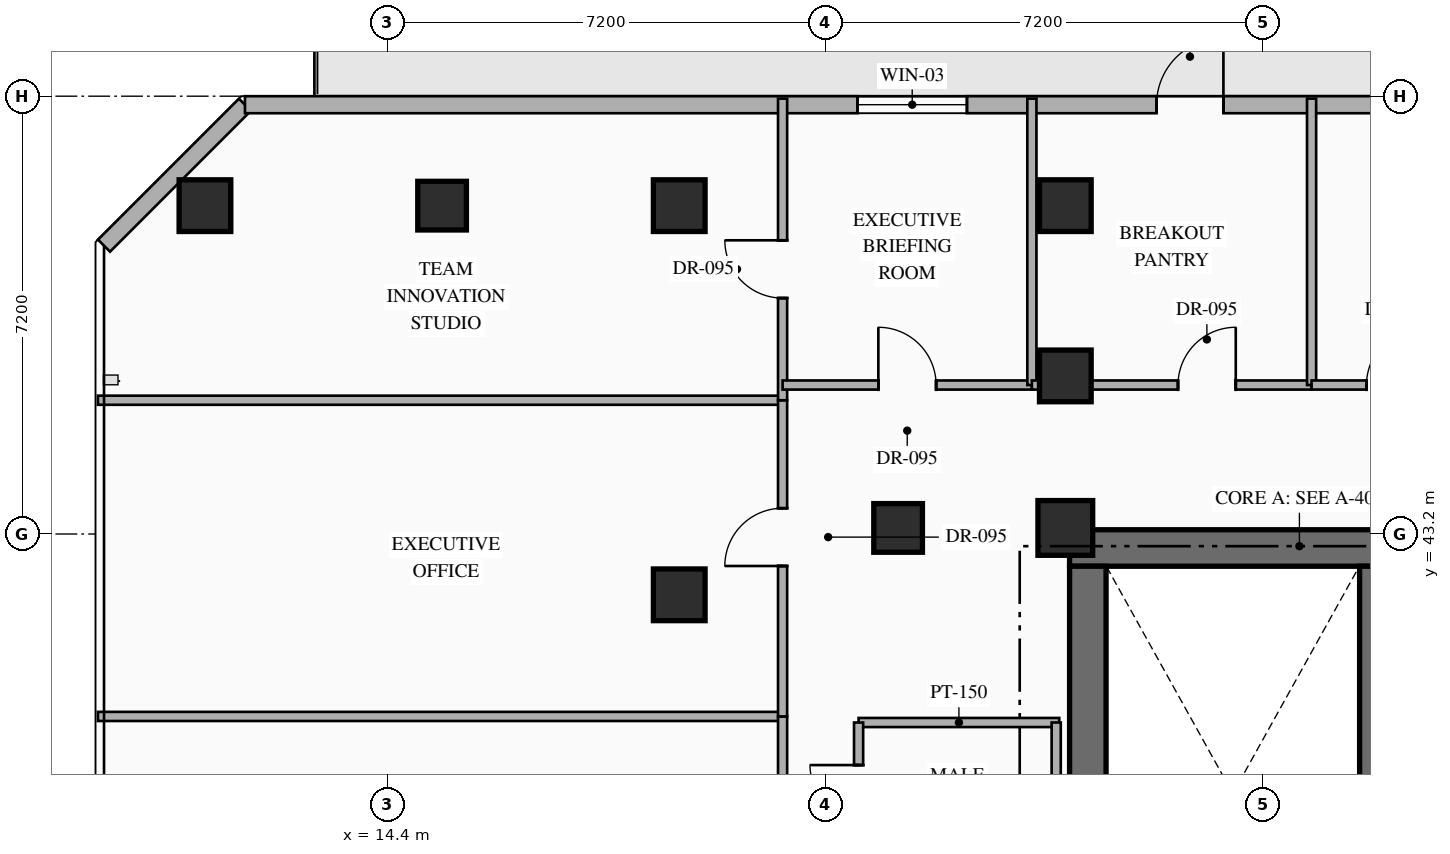
"""IFC4 building model, lengths in metres.
Left out: names, types, materials, properties, quantities, classifications, styles, units other than length and angle.
Written with IfcOpenShell. Run it as: python <this file> out.ifc"""

import sys

from ifc_helpers import new_model, si_unit, direction, frame, frame_2d, origin, origin_2d, place, context, subcontext, project, spatial, rectangle, hollow_rectangle, extrude, element, fill, save


model = new_model("IFC4")
c1 = context("Model", 3, precision=1e-05, world=origin(), true_north=direction((0.0, 1.0)))
c2 = subcontext(c1, "Body", "Model", "MODEL_VIEW")
j1 = project(units=[si_unit("LENGTHUNIT", "METRE"), si_unit("PLANEANGLEUNIT", "RADIAN")], contexts=[c1])
p1 = place(None, origin())
s1 = spatial("IfcSite", under=j1, at=p1, CompositionType="ELEMENT")
p2 = place(p1, origin())
s2 = spatial("IfcBuilding", under=s1, at=p2, CompositionType="ELEMENT")
p3 = place(p2, frame((0.0, 0.0, 149.25)))
s3 = spatial("IfcBuildingStorey", under=s2, at=p3, CompositionType="ELEMENT", Elevation=149.25)
p4 = place(p3, frame((25.62, 42.97, 0.0), z_axis=(0.0, 0.0, 1.0), x_axis=(1.0, 0.0, 0.0)))
e1 = element("IfcWall", 1, at=p4, inside=s3, PredefinedType="SHEAR", context=c2, shape_type="SweptSolid", body=[
    extrude(rectangle(XDim=7.78, YDim=0.6, at=frame_2d((3.89, 0.0))), origin(), (0.0, 0.0, 1.0), 3.6),
])
p5 = place(p3, frame((25.92, 33.19, 0.0), z_axis=(0.0, 0.0, 1.0), x_axis=(0.0, 1.0, 0.0)))
e2 = element("IfcWall", 2, at=p5, inside=s3, PredefinedType="SHEAR", context=c2, shape_type="SweptSolid", body=[
    extrude(rectangle(XDim=9.48, YDim=0.6, at=frame_2d((4.74, 0.0))), origin(), (0.0, 0.0, 1.0), 3.6),
])
p6 = place(p3, frame((30.54, 33.19, 0.0), z_axis=(0.0, 0.0, 1.0), x_axis=(0.0, 1.0, 0.0)))
e3 = element("IfcWall", 3, at=p6, inside=s3, PredefinedType="SHEAR", context=c2, shape_type="SweptSolid", body=[
    extrude(rectangle(XDim=9.48, YDim=0.3, at=frame_2d((4.74, 0.0))), origin(), (0.0, 0.0, 1.0), 3.6),
])
p7 = place(p3, frame((25.55, 43.3, 0.0), z_axis=(0.0, 0.0, 1.0), x_axis=(1.0, 0.0, 0.0)))
e4 = element("IfcColumn", 4, at=p7, inside=s3, PredefinedType="COLUMN", context=c2, shape_type="SweptSolid", body=[
    extrude(rectangle(XDim=0.9, YDim=0.9, at=origin_2d()), origin(), (0.0, 0.0, 1.0), 3.6),
])
for number, where, z_axis, x_axis in (
    (5, (25.55, 45.8, 0.0), (0.0, 0.0, 1.0), (1.0, 0.0, 0.0)),
    (6, (11.4, 48.6, 0.0), (0.0, 0.0, 1.0), (1.0, 0.0, 0.0)),
    (7, (19.2, 48.6, 0.0), (0.0, 0.0, 1.0), (1.0, 0.0, 0.0)),
    (8, (25.55, 48.6, 0.0), (0.0, 0.0, 1.0), (1.0, 0.0, 0.0)),
    (9, (19.2, 42.2, 0.0), (0.0, 0.0, 1.0), (1.0, 0.0, 0.0)),
):
    element("IfcColumn", number, at=place(p3, frame(where, z_axis=z_axis, x_axis=x_axis)), inside=s3, PredefinedType="COLUMN", context=c2, shape_type="SweptSolid", body=[
        extrude(hollow_rectangle(XDim=0.85, YDim=0.85, WallThickness=0.032, at=origin_2d()), origin(), (0.0, 0.0, 1.0), 3.6),
    ])
for number, where, z_axis, x_axis in (
    (10, (22.8, 43.3, 0.0), (0.0, 0.0, 1.0), (1.0, 0.0, 0.0)),
    (11, (15.3, 48.6, 0.0), (0.0, 0.0, 1.0), (1.0, 0.0, 0.0)),
):
    element("IfcColumn", number, at=place(p3, frame(where, z_axis=z_axis, x_axis=x_axis)), inside=s3, PredefinedType="COLUMN", context=c2, shape_type="SweptSolid", body=[
        extrude(hollow_rectangle(XDim=0.8, YDim=0.8, WallThickness=0.032, at=origin_2d()), origin(), (0.0, 0.0, 1.0), 3.6),
    ])
p8 = place(p3, frame((9.74, 47.942, 0.0), z_axis=(0.0, 0.0, 1.0), x_axis=(0.707106781187, 0.707106781187, 0.0)))
e12 = element("IfcWall", 12, at=p8, inside=s3, PredefinedType="STANDARD", context=c2, shape_type="SweptSolid", body=[
    extrude(rectangle(XDim=3.278, YDim=0.28, at=frame_2d((1.639, 0.0))), origin(), (0.0, 0.0, 1.0), 3.35),
])
p9 = place(p3, frame((12.058, 50.26, 0.0), z_axis=(0.0, 0.0, 1.0), x_axis=(1.0, 0.0, 0.0)))
e13 = element("IfcWall", 13, at=p9, inside=s3, PredefinedType="STANDARD", context=c2, shape_type="SweptSolid", body=[
    extrude(rectangle(XDim=30.484, YDim=0.28, at=frame_2d((15.242, 0.0))), origin(), (0.0, 0.0, 1.0), 3.35),
])
p10 = place(p9, frame((14.992, 0.0, 0.0)))
e14 = element("IfcOpeningElement", 14, at=p10, cuts=e13, PredefinedType="OPENING", context=c2, shape_type="SweptSolid", body=[
    extrude(rectangle(XDim=1.1, YDim=2.2, at=frame_2d((0.55, 1.1))), frame((0.0, 0.15, 0.0), z_axis=(0.0, -1.0, 0.0), x_axis=(1.0, 0.0, 0.0)), (0.0, 0.0, 1.0), 0.3),
])
p11 = place(p9, frame((10.074, 0.0, 0.85)))
e15 = element("IfcOpeningElement", 15, at=p11, cuts=e13, PredefinedType="OPENING", context=c2, shape_type="SweptSolid", body=[
    extrude(rectangle(XDim=1.8, YDim=2.1, at=frame_2d((0.9, 1.05))), frame((0.0, 0.15, 0.0), z_axis=(0.0, -1.0, 0.0), x_axis=(1.0, 0.0, 0.0)), (0.0, 0.0, 1.0), 0.3),
])
p12 = place(p3, frame((22.15, 40.1, 0.0), z_axis=(0.0, 0.0, 1.0), x_axis=(1.0, 0.0, 0.0)))
e16 = element("IfcWall", 16, at=p12, inside=s3, PredefinedType="PARTITIONING", context=c2, shape_type="SweptSolid", body=[
    extrude(rectangle(XDim=3.3, YDim=0.15, at=frame_2d((1.65, 0.0))), origin(), (0.0, 0.0, 1.0), 3.35),
])
p13 = place(p3, frame((25.4, 33.5, 0.0), z_axis=(0.0, 0.0, 1.0), x_axis=(0.0, 1.0, 0.0)))
e17 = element("IfcWall", 17, at=p13, inside=s3, PredefinedType="PARTITIONING", context=c2, shape_type="SweptSolid", body=[
    extrude(rectangle(XDim=6.6, YDim=0.15, at=frame_2d((3.3, 0.0))), origin(), (0.0, 0.0, 1.0), 3.35),
])
p14 = place(p3, frame((22.15, 37.9, 0.0), z_axis=(0.0, 0.0, 1.0), x_axis=(0.0, 1.0, 0.0)))
e18 = element("IfcWall", 18, at=p14, inside=s3, PredefinedType="PARTITIONING", context=c2, shape_type="SweptSolid", body=[
    extrude(rectangle(XDim=2.2, YDim=0.15, at=frame_2d((1.1, 0.0))), origin(), (0.0, 0.0, 1.0), 3.35),
])
p15 = place(p14, frame((0.7, 0.0, 0.0)))
e19 = element("IfcOpeningElement", 19, at=p15, cuts=e18, PredefinedType="OPENING", context=c2, shape_type="SweptSolid", body=[
    extrude(rectangle(XDim=0.8, YDim=2.06, at=frame_2d((0.4, 1.03))), frame((0.0, 0.085, 0.0), z_axis=(0.0, -1.0, 0.0), x_axis=(1.0, 0.0, 0.0)), (0.0, 0.0, 1.0), 0.17),
])
p16 = place(p3, frame((9.64, 40.2, 0.0), z_axis=(0.0, 0.0, 1.0), x_axis=(1.0, 0.0, 0.0)))
e20 = element("IfcWall", 20, at=p16, inside=s3, PredefinedType="PARTITIONING", context=c2, shape_type="SweptSolid", body=[
    extrude(rectangle(XDim=11.26, YDim=0.15, at=frame_2d((5.63, 0.0))), origin(), (0.0, 0.0, 1.0), 3.35),
])
p17 = place(p3, frame((20.9, 35.6, 0.0), z_axis=(0.0, 0.0, 1.0), x_axis=(0.0, 1.0, 0.0)))
e21 = element("IfcWall", 21, at=p17, inside=s3, PredefinedType="PARTITIONING", context=c2, shape_type="SweptSolid", body=[
    extrude(rectangle(XDim=4.6, YDim=0.15, at=frame_2d((2.3, 0.0))), origin(), (0.0, 0.0, 1.0), 3.35),
])
p18 = place(p17, frame((1.825, 0.0, 0.0)))
e22 = element("IfcOpeningElement", 22, at=p18, cuts=e21, PredefinedType="OPENING", context=c2, shape_type="SweptSolid", body=[
    extrude(rectangle(XDim=0.95, YDim=2.15, at=frame_2d((0.475, 1.075))), frame((0.0, 0.085, 0.0), z_axis=(0.0, -1.0, 0.0), x_axis=(1.0, 0.0, 0.0)), (0.0, 0.0, 1.0), 0.17),
])
p19 = place(p3, frame((9.64, 45.4, 0.0), z_axis=(0.0, 0.0, 1.0), x_axis=(1.0, 0.0, 0.0)))
e23 = element("IfcWall", 23, at=p19, inside=s3, PredefinedType="PARTITIONING", context=c2, shape_type="SweptSolid", body=[
    extrude(rectangle(XDim=11.26, YDim=0.15, at=frame_2d((5.63, 0.0))), origin(), (0.0, 0.0, 1.0), 3.35),
])
p20 = place(p3, frame((20.9, 40.2, 0.0), z_axis=(0.0, 0.0, 1.0), x_axis=(0.0, 1.0, 0.0)))
e24 = element("IfcWall", 24, at=p20, inside=s3, PredefinedType="PARTITIONING", context=c2, shape_type="SweptSolid", body=[
    extrude(rectangle(XDim=5.2, YDim=0.15, at=frame_2d((2.6, 0.0))), origin(), (0.0, 0.0, 1.0), 3.35),
])
p21 = place(p20, frame((2.474, 0.0, 0.0)))
e25 = element("IfcOpeningElement", 25, at=p21, cuts=e24, PredefinedType="OPENING", context=c2, shape_type="SweptSolid", body=[
    extrude(rectangle(XDim=0.95, YDim=2.15, at=frame_2d((0.475, 1.075))), frame((0.0, 0.085, 0.0), z_axis=(0.0, -1.0, 0.0), x_axis=(1.0, 0.0, 0.0)), (0.0, 0.0, 1.0), 0.17),
])
p22 = place(p3, frame((20.9, 45.4, 0.0), z_axis=(0.0, 0.0, 1.0), x_axis=(0.0, 1.0, 0.0)))
e26 = element("IfcWall", 26, at=p22, inside=s3, PredefinedType="PARTITIONING", context=c2, shape_type="SweptSolid", body=[
    extrude(rectangle(XDim=4.96, YDim=0.15, at=frame_2d((2.48, 0.0))), origin(), (0.0, 0.0, 1.0), 3.35),
])
p23 = place(p22, frame((1.68, 0.0, 0.0)))
e27 = element("IfcOpeningElement", 27, at=p23, cuts=e26, PredefinedType="OPENING", context=c2, shape_type="SweptSolid", body=[
    extrude(rectangle(XDim=0.95, YDim=2.15, at=frame_2d((0.475, 1.075))), frame((0.0, 0.085, 0.0), z_axis=(0.0, -1.0, 0.0), x_axis=(1.0, 0.0, 0.0)), (0.0, 0.0, 1.0), 0.17),
])
p24 = place(p3, frame((20.9, 45.65, 0.0), z_axis=(0.0, 0.0, 1.0), x_axis=(1.0, 0.0, 0.0)))
e28 = element("IfcWall", 28, at=p24, inside=s3, PredefinedType="PARTITIONING", context=c2, shape_type="SweptSolid", body=[
    extrude(rectangle(XDim=4.1, YDim=0.15, at=frame_2d((2.05, 0.0))), origin(), (0.0, 0.0, 1.0), 3.35),
])
p25 = place(p24, frame((1.575, 0.0, 0.0)))
e29 = element("IfcOpeningElement", 29, at=p25, cuts=e28, PredefinedType="OPENING", context=c2, shape_type="SweptSolid", body=[
    extrude(rectangle(XDim=0.95, YDim=2.15, at=frame_2d((0.475, 1.075))), frame((0.0, 0.085, 0.0), z_axis=(0.0, -1.0, 0.0), x_axis=(1.0, 0.0, 0.0)), (0.0, 0.0, 1.0), 0.17),
])
p26 = place(p3, frame((25.0, 45.65, 0.0), z_axis=(0.0, 0.0, 1.0), x_axis=(0.0, 1.0, 0.0)))
e30 = element("IfcWall", 30, at=p26, inside=s3, PredefinedType="PARTITIONING", context=c2, shape_type="SweptSolid", body=[
    extrude(rectangle(XDim=4.71, YDim=0.15, at=frame_2d((2.355, 0.0))), origin(), (0.0, 0.0, 1.0), 3.35),
])
p27 = place(p3, frame((25.0, 45.65, 0.0), z_axis=(0.0, 0.0, 1.0), x_axis=(1.0, 0.0, 0.0)))
e31 = element("IfcWall", 31, at=p27, inside=s3, PredefinedType="PARTITIONING", context=c2, shape_type="SweptSolid", body=[
    extrude(rectangle(XDim=4.6, YDim=0.15, at=frame_2d((2.3, 0.0))), origin(), (0.0, 0.0, 1.0), 2.695),
])
p28 = place(p27, frame((2.403, 0.0, 0.0)))
e32 = element("IfcOpeningElement", 32, at=p28, cuts=e31, PredefinedType="OPENING", context=c2, shape_type="SweptSolid", body=[
    extrude(rectangle(XDim=0.95, YDim=2.15, at=frame_2d((0.475, 1.075))), frame((0.0, 0.085, 0.0), z_axis=(0.0, -1.0, 0.0), x_axis=(1.0, 0.0, 0.0)), (0.0, 0.0, 1.0), 0.17),
])
p29 = place(p3, frame((29.6, 45.65, 0.0), z_axis=(0.0, 0.0, 1.0), x_axis=(0.0, 1.0, 0.0)))
e33 = element("IfcWall", 33, at=p29, inside=s3, PredefinedType="PARTITIONING", context=c2, shape_type="SweptSolid", body=[
    extrude(rectangle(XDim=4.71, YDim=0.15, at=frame_2d((2.355, 0.0))), origin(), (0.0, 0.0, 1.0), 3.35),
])
p30 = place(p3, frame((29.6, 45.65, 0.0), z_axis=(0.0, 0.0, 1.0), x_axis=(1.0, 0.0, 0.0)))
e34 = element("IfcWall", 34, at=p30, inside=s3, PredefinedType="PARTITIONING", context=c2, shape_type="SweptSolid", body=[
    extrude(rectangle(XDim=5.2, YDim=0.15, at=frame_2d((2.6, 0.0))), origin(), (0.0, 0.0, 1.0), 2.695),
])
p31 = place(p30, frame((0.903, 0.0, 0.0)))
e35 = element("IfcOpeningElement", 35, at=p31, cuts=e34, PredefinedType="OPENING", context=c2, shape_type="SweptSolid", body=[
    extrude(rectangle(XDim=0.95, YDim=2.15, at=frame_2d((0.475, 1.075))), frame((0.0, 0.085, 0.0), z_axis=(0.0, -1.0, 0.0), x_axis=(1.0, 0.0, 0.0)), (0.0, 0.0, 1.0), 0.17),
])
p32 = place(p10, origin())
e36 = element("IfcDoor", 36, at=p32, inside=s3, OperationType="SINGLE_SWING_RIGHT", PredefinedType="DOOR", context=c2, shape_type="SweptSolid", body=[
    extrude(rectangle(XDim=1.1, YDim=2.2, at=frame_2d((0.55, 1.1))), frame((0.0, 0.025, 0.0), z_axis=(0.0, -1.0, 0.0), x_axis=(1.0, 0.0, 0.0)), (0.0, 0.0, 1.0), 0.05),
])
fill(e14, e36)
p33 = place(p11, origin())
e37 = element("IfcWindow", 37, at=p33, inside=s3, PartitioningType="SINGLE_PANEL", PredefinedType="WINDOW", context=c2, shape_type="SweptSolid", body=[
    extrude(rectangle(XDim=1.8, YDim=2.1, at=frame_2d((0.9, 1.05))), frame((0.0, 0.03, 0.0), z_axis=(0.0, -1.0, 0.0), x_axis=(1.0, 0.0, 0.0)), (0.0, 0.0, 1.0), 0.06),
])
fill(e15, e37)
p34 = place(p15, origin())
e38 = element("IfcDoor", 38, at=p34, inside=s3, OperationType="SINGLE_SWING_RIGHT", PredefinedType="DOOR", context=c2, shape_type="SweptSolid", body=[
    extrude(rectangle(XDim=0.8, YDim=2.06, at=frame_2d((0.4, 1.03))), frame((0.0, 0.025, 0.0), z_axis=(0.0, -1.0, 0.0), x_axis=(1.0, 0.0, 0.0)), (0.0, 0.0, 1.0), 0.05),
])
fill(e19, e38)
p35 = place(p21, origin())
e39 = element("IfcDoor", 39, at=p35, inside=s3, OperationType="SINGLE_SWING_LEFT", PredefinedType="DOOR", context=c2, shape_type="SweptSolid", body=[
    extrude(rectangle(XDim=0.95, YDim=2.15, at=frame_2d((0.475, 1.075))), frame((0.0, 0.025, 0.0), z_axis=(0.0, -1.0, 0.0), x_axis=(1.0, 0.0, 0.0)), (0.0, 0.0, 1.0), 0.05),
])
fill(e25, e39)
p36 = place(p23, origin())
e40 = element("IfcDoor", 40, at=p36, inside=s3, OperationType="SINGLE_SWING_RIGHT", PredefinedType="DOOR", context=c2, shape_type="SweptSolid", body=[
    extrude(rectangle(XDim=0.95, YDim=2.15, at=frame_2d((0.475, 1.075))), frame((0.0, 0.025, 0.0), z_axis=(0.0, -1.0, 0.0), x_axis=(1.0, 0.0, 0.0)), (0.0, 0.0, 1.0), 0.05),
])
fill(e27, e40)
p37 = place(p25, origin())
e41 = element("IfcDoor", 41, at=p37, inside=s3, OperationType="SINGLE_SWING_LEFT", PredefinedType="DOOR", context=c2, shape_type="SweptSolid", body=[
    extrude(rectangle(XDim=0.95, YDim=2.15, at=frame_2d((0.475, 1.075))), frame((0.0, 0.025, 0.0), z_axis=(0.0, -1.0, 0.0), x_axis=(1.0, 0.0, 0.0)), (0.0, 0.0, 1.0), 0.05),
])
fill(e29, e41)
p38 = place(p28, origin())
e42 = element("IfcDoor", 42, at=p38, inside=s3, OperationType="SINGLE_SWING_RIGHT", PredefinedType="DOOR", context=c2, shape_type="SweptSolid", body=[
    extrude(rectangle(XDim=0.95, YDim=2.15, at=frame_2d((0.475, 1.075))), frame((0.0, 0.025, 0.0), z_axis=(0.0, -1.0, 0.0), x_axis=(1.0, 0.0, 0.0)), (0.0, 0.0, 1.0), 0.05),
])
fill(e32, e42)
p39 = place(p31, origin())
e43 = element("IfcDoor", 43, at=p39, inside=s3, OperationType="SINGLE_SWING_RIGHT", PredefinedType="DOOR", context=c2, shape_type="SweptSolid", body=[
    extrude(rectangle(XDim=0.95, YDim=2.15, at=frame_2d((0.475, 1.075))), frame((0.0, 0.025, 0.0), z_axis=(0.0, -1.0, 0.0), x_axis=(1.0, 0.0, 0.0)), (0.0, 0.0, 1.0), 0.05),
])
fill(e35, e43)
save(model, sys.argv[1])
